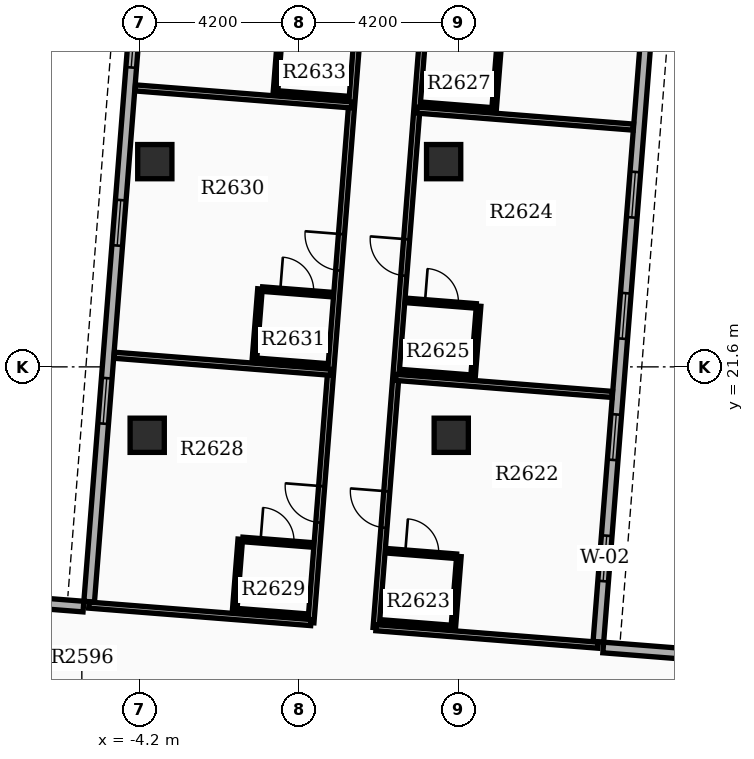
"""IFC4 building model, lengths in metres.
Left out: names, types, materials, properties, quantities, classifications, styles, units other than length and angle.
Written with IfcOpenShell. Run it as: python <this file> out.ifc"""

import sys

from ifc_helpers import new_model, si_unit, direction, frame, frame_2d, origin, origin_2d, place, context, subcontext, project, spatial, rectangle, extrude, element, fill, save


model = new_model("IFC4")
c1 = context("Model", 3, precision=1e-05, world=origin(), true_north=direction((0.0, 1.0)))
c2 = subcontext(c1, "Body", "Model", "MODEL_VIEW")
j1 = project(units=[si_unit("LENGTHUNIT", "METRE"), si_unit("PLANEANGLEUNIT", "RADIAN")], contexts=[c1])
p1 = place(None, origin())
s1 = spatial("IfcSite", under=j1, at=p1, CompositionType="ELEMENT")
p2 = place(p1, origin())
s2 = spatial("IfcBuilding", under=s1, at=p2, CompositionType="ELEMENT")
p3 = place(p2, frame((0.0, 0.0, 164.4)))
s3 = spatial("IfcBuildingStorey", under=s2, at=p3, CompositionType="ELEMENT", Elevation=164.4)
for number, where, z_axis, x_axis in (
    (1, (-4.0, 19.8, 0.0), (0.0, 0.0, 1.0), (1.0, 0.0, 0.0)),
    (2, (4.0, 19.8, 0.0), (0.0, 0.0, 1.0), (1.0, 0.0, 0.0)),
    (3, (-3.8, 27.0, 0.0), (0.0, 0.0, 1.0), (1.0, 0.0, 0.0)),
    (4, (3.8, 27.0, 0.0), (0.0, 0.0, 1.0), (1.0, 0.0, 0.0)),
):
    element("IfcColumn", number, at=place(p3, frame(where, z_axis=z_axis, x_axis=x_axis)), inside=s3, PredefinedType="COLUMN", context=c2, shape_type="SweptSolid", body=[
        extrude(rectangle(XDim=0.9, YDim=0.9, at=origin_2d()), origin(), (0.0, 0.0, 1.0), 3.9),
    ])
p4 = place(p3, frame((7.872, 14.367, 0.0), z_axis=(0.0, 0.0, 1.0), x_axis=(0.078452802979, 0.996917828963, 0.0)))
e5 = element("IfcWall", 5, at=p4, inside=s3, PredefinedType="STANDARD", context=c2, shape_type="SweptSolid", body=[
    extrude(rectangle(XDim=20.1, YDim=0.28, at=frame_2d((10.05, 0.0))), origin(), (0.0, 0.0, 1.0), 2.97),
])
p5 = place(p4, frame((1.6, 0.0, 0.8)))
e6 = element("IfcOpeningElement", 6, at=p5, cuts=e5, PredefinedType="OPENING", context=c2, shape_type="SweptSolid", body=[
    extrude(rectangle(XDim=1.2, YDim=1.6, at=frame_2d((0.6, 0.8))), frame((0.0, 0.15, 0.0), z_axis=(0.0, -1.0, 0.0), x_axis=(1.0, 0.0, 0.0)), (0.0, 0.0, 1.0), 0.3),
])
p6 = place(p4, frame((4.8, 0.0, 0.8)))
e7 = element("IfcOpeningElement", 7, at=p6, cuts=e5, PredefinedType="OPENING", context=c2, shape_type="SweptSolid", body=[
    extrude(rectangle(XDim=1.2, YDim=1.6, at=frame_2d((0.6, 0.8))), frame((0.0, 0.15, 0.0), z_axis=(0.0, -1.0, 0.0), x_axis=(1.0, 0.0, 0.0)), (0.0, 0.0, 1.0), 0.3),
])
p7 = place(p4, frame((8.0, 0.0, 0.8)))
e8 = element("IfcOpeningElement", 8, at=p7, cuts=e5, PredefinedType="OPENING", context=c2, shape_type="SweptSolid", body=[
    extrude(rectangle(XDim=1.2, YDim=1.6, at=frame_2d((0.6, 0.8))), frame((0.0, 0.15, 0.0), z_axis=(0.0, -1.0, 0.0), x_axis=(1.0, 0.0, 0.0)), (0.0, 0.0, 1.0), 0.3),
])
p8 = place(p4, frame((11.2, 0.0, 0.8)))
e9 = element("IfcOpeningElement", 9, at=p8, cuts=e5, PredefinedType="OPENING", context=c2, shape_type="SweptSolid", body=[
    extrude(rectangle(XDim=1.2, YDim=1.6, at=frame_2d((0.6, 0.8))), frame((0.0, 0.15, 0.0), z_axis=(0.0, -1.0, 0.0), x_axis=(1.0, 0.0, 0.0)), (0.0, 0.0, 1.0), 0.3),
])
p9 = place(p3, frame((-3.95, 35.459, 0.0), z_axis=(0.0, 0.0, 1.0), x_axis=(-0.078452802979, -0.996917828963, 0.0)))
e10 = element("IfcWall", 10, at=p9, inside=s3, PredefinedType="STANDARD", context=c2, shape_type="SweptSolid", body=[
    extrude(rectangle(XDim=20.1, YDim=0.28, at=frame_2d((10.05, 0.0))), origin(), (0.0, 0.0, 1.0), 2.97),
])
p10 = place(p9, frame((1.6, 0.0, 0.8)))
e11 = element("IfcOpeningElement", 11, at=p10, cuts=e10, PredefinedType="OPENING", context=c2, shape_type="SweptSolid", body=[
    extrude(rectangle(XDim=1.2, YDim=1.6, at=frame_2d((0.6, 0.8))), frame((0.0, 0.15, 0.0), z_axis=(0.0, -1.0, 0.0), x_axis=(1.0, 0.0, 0.0)), (0.0, 0.0, 1.0), 0.3),
])
p11 = place(p9, frame((4.8, 0.0, 0.8)))
e12 = element("IfcOpeningElement", 12, at=p11, cuts=e10, PredefinedType="OPENING", context=c2, shape_type="SweptSolid", body=[
    extrude(rectangle(XDim=1.2, YDim=1.6, at=frame_2d((0.6, 0.8))), frame((0.0, 0.15, 0.0), z_axis=(0.0, -1.0, 0.0), x_axis=(1.0, 0.0, 0.0)), (0.0, 0.0, 1.0), 0.3),
])
p12 = place(p9, frame((9.5, 0.0, 0.8)))
e13 = element("IfcOpeningElement", 13, at=p12, cuts=e10, PredefinedType="OPENING", context=c2, shape_type="SweptSolid", body=[
    extrude(rectangle(XDim=1.2, YDim=1.6, at=frame_2d((0.6, 0.8))), frame((0.0, 0.15, 0.0), z_axis=(0.0, -1.0, 0.0), x_axis=(1.0, 0.0, 0.0)), (0.0, 0.0, 1.0), 0.3),
])
p13 = place(p9, frame((14.2, 0.0, 0.8)))
e14 = element("IfcOpeningElement", 14, at=p13, cuts=e10, PredefinedType="OPENING", context=c2, shape_type="SweptSolid", body=[
    extrude(rectangle(XDim=1.2, YDim=1.6, at=frame_2d((0.6, 0.8))), frame((0.0, 0.15, 0.0), z_axis=(0.0, -1.0, 0.0), x_axis=(1.0, 0.0, 0.0)), (0.0, 0.0, 1.0), 0.3),
])
p14 = place(p3, frame((14.281, 13.722, 0.0), z_axis=(0.0, 0.0, 1.0), x_axis=(-0.99691915642, 0.078435932851, 0.0)))
e15 = element("IfcWall", 15, at=p14, inside=s3, PredefinedType="STANDARD", context=c2, shape_type="SweptSolid", body=[
    extrude(rectangle(XDim=6.3, YDim=0.28, at=frame_2d((3.15, 0.0))), origin(), (0.0, 0.0, 1.0), 2.97),
])
p15 = place(p3, frame((-11.958, 15.787, 0.0), z_axis=(0.0, 0.0, 1.0), x_axis=(0.996916125428, -0.078474447191, 0.0)))
e16 = element("IfcWall", 16, at=p15, inside=s3, PredefinedType="STANDARD", context=c2, shape_type="SweptSolid", body=[
    extrude(rectangle(XDim=6.3, YDim=0.28, at=frame_2d((3.15, 0.0))), origin(), (0.0, 0.0, 1.0), 2.97),
])
p16 = place(p3, frame((2.022, 14.737, 0.0), z_axis=(0.0, 0.0, 1.0), x_axis=(0.078461408156, 0.996917151738, 0.0)))
e17 = element("IfcWall", 17, at=p16, inside=s3, PredefinedType="PARTITIONING", context=c2, shape_type="SweptSolid", body=[
    extrude(rectangle(XDim=20.182, YDim=0.16, at=frame_2d((10.091, 0.0))), origin(), (0.0, 0.0, 1.0), 2.96),
])
p17 = place(p16, frame((2.641, 0.0, 0.0)))
e18 = element("IfcOpeningElement", 18, at=p17, cuts=e17, PredefinedType="OPENING", context=c2, shape_type="SweptSolid", body=[
    extrude(rectangle(XDim=0.96, YDim=2.15, at=frame_2d((0.48, 1.075))), frame((0.0, 0.09, 0.0), z_axis=(0.0, -1.0, 0.0), x_axis=(1.0, 0.0, 0.0)), (0.0, 0.0, 1.0), 0.18),
])
p18 = place(p16, frame((9.293, 0.0, 0.0)))
e19 = element("IfcOpeningElement", 19, at=p18, cuts=e17, PredefinedType="OPENING", context=c2, shape_type="SweptSolid", body=[
    extrude(rectangle(XDim=0.96, YDim=2.15, at=frame_2d((0.48, 1.075))), frame((0.0, 0.09, 0.0), z_axis=(0.0, -1.0, 0.0), x_axis=(1.0, 0.0, 0.0)), (0.0, 0.0, 1.0), 0.18),
])
p19 = place(p16, frame((18.93, 0.0, 0.0)))
e20 = element("IfcOpeningElement", 20, at=p19, cuts=e17, PredefinedType="OPENING", context=c2, shape_type="SweptSolid", body=[
    extrude(rectangle(XDim=0.96, YDim=2.15, at=frame_2d((0.48, 1.075))), frame((0.0, 0.09, 0.0), z_axis=(0.0, -1.0, 0.0), x_axis=(1.0, 0.0, 0.0)), (0.0, 0.0, 1.0), 0.18),
])
p20 = place(p3, frame((2.022, 14.737, 0.0), z_axis=(0.0, 0.0, 1.0), x_axis=(0.996918158581, -0.078448614343, 0.0)))
e21 = element("IfcWall", 21, at=p20, inside=s3, PredefinedType="PARTITIONING", context=c2, shape_type="SweptSolid", body=[
    extrude(rectangle(XDim=5.86, YDim=0.16, at=frame_2d((2.93, 0.0))), origin(), (0.0, 0.0, 1.0), 2.96),
])
p21 = place(p3, frame((2.541, 21.323, 0.0), z_axis=(0.0, 0.0, 1.0), x_axis=(0.996916388627, -0.078471103516, 0.0)))
e22 = element("IfcWall", 22, at=p21, inside=s3, PredefinedType="PARTITIONING", context=c2, shape_type="SweptSolid", body=[
    extrude(rectangle(XDim=5.712, YDim=0.16, at=frame_2d((2.856, 0.0))), origin(), (0.0, 0.0, 1.0), 2.96),
])
p22 = place(p3, frame((2.322, 16.76, 0.0), z_axis=(0.0, 0.0, 1.0), x_axis=(0.996916400774, -0.0784709492, 0.0)))
e23 = element("IfcWall", 23, at=p22, inside=s3, PredefinedType="PARTITIONING", context=c2, shape_type="SweptSolid", body=[
    extrude(rectangle(XDim=1.82, YDim=0.12, at=frame_2d((0.91, 0.0))), origin(), (0.0, 0.0, 1.0), 2.96),
])
p23 = place(p22, frame((0.47, 0.0, 0.0)))
e24 = element("IfcOpeningElement", 24, at=p23, cuts=e23, PredefinedType="OPENING", context=c2, shape_type="SweptSolid", body=[
    extrude(rectangle(XDim=0.88, YDim=2.1, at=frame_2d((0.44, 1.05))), frame((0.0, 0.07, 0.0), z_axis=(0.0, -1.0, 0.0), x_axis=(1.0, 0.0, 0.0)), (0.0, 0.0, 1.0), 0.14),
])
p24 = place(p3, frame((2.175, 14.885, 0.0), z_axis=(0.0, 0.0, 1.0), x_axis=(0.996916400774, -0.0784709492, 0.0)))
e25 = element("IfcWall", 25, at=p24, inside=s3, PredefinedType="PARTITIONING", context=c2, shape_type="SweptSolid", body=[
    extrude(rectangle(XDim=1.82, YDim=0.12, at=frame_2d((0.91, 0.0))), origin(), (0.0, 0.0, 1.0), 2.96),
])
p25 = place(p3, frame((4.054, 14.737, 0.0), z_axis=(0.0, 0.0, 1.0), x_axis=(0.078563244057, 0.996909131608, 0.0)))
e26 = element("IfcWall", 26, at=p25, inside=s3, PredefinedType="PARTITIONING", context=c2, shape_type="SweptSolid", body=[
    extrude(rectangle(XDim=1.88, YDim=0.12, at=frame_2d((0.94, 0.0))), origin(), (0.0, 0.0, 1.0), 2.96),
])
p26 = place(p3, frame((3.094, 28.357, 0.0), z_axis=(0.0, 0.0, 1.0), x_axis=(0.996916125428, -0.078474447191, 0.0)))
e27 = element("IfcWall", 27, at=p26, inside=s3, PredefinedType="PARTITIONING", context=c2, shape_type="SweptSolid", body=[
    extrude(rectangle(XDim=5.712, YDim=0.16, at=frame_2d((2.856, 0.0))), origin(), (0.0, 0.0, 1.0), 2.96),
])
p27 = place(p3, frame((2.841, 23.346, 0.0), z_axis=(0.0, 0.0, 1.0), x_axis=(0.996915574626, -0.078481444107, 0.0)))
e28 = element("IfcWall", 28, at=p27, inside=s3, PredefinedType="PARTITIONING", context=c2, shape_type="SweptSolid", body=[
    extrude(rectangle(XDim=1.82, YDim=0.12, at=frame_2d((0.91, 0.0))), origin(), (0.0, 0.0, 1.0), 2.96),
])
p28 = place(p27, frame((0.47, 0.0, 0.0)))
e29 = element("IfcOpeningElement", 29, at=p28, cuts=e28, PredefinedType="OPENING", context=c2, shape_type="SweptSolid", body=[
    extrude(rectangle(XDim=0.88, YDim=2.1, at=frame_2d((0.44, 1.05))), frame((0.0, 0.07, 0.0), z_axis=(0.0, -1.0, 0.0), x_axis=(1.0, 0.0, 0.0)), (0.0, 0.0, 1.0), 0.14),
])
p29 = place(p3, frame((2.693, 21.472, 0.0), z_axis=(0.0, 0.0, 1.0), x_axis=(0.996915574626, -0.078481444107, 0.0)))
e30 = element("IfcWall", 30, at=p29, inside=s3, PredefinedType="PARTITIONING", context=c2, shape_type="SweptSolid", body=[
    extrude(rectangle(XDim=1.82, YDim=0.12, at=frame_2d((0.91, 0.0))), origin(), (0.0, 0.0, 1.0), 2.96),
])
p30 = place(p3, frame((4.572, 21.324, 0.0), z_axis=(0.0, 0.0, 1.0), x_axis=(0.07843418698, 0.996919293781, 0.0)))
e31 = element("IfcWall", 31, at=p30, inside=s3, PredefinedType="PARTITIONING", context=c2, shape_type="SweptSolid", body=[
    extrude(rectangle(XDim=1.88, YDim=0.12, at=frame_2d((0.94, 0.0))), origin(), (0.0, 0.0, 1.0), 2.96),
])
p31 = place(p3, frame((3.247, 28.505, 0.0), z_axis=(0.0, 0.0, 1.0), x_axis=(0.996915574626, -0.078481444107, 0.0)))
e32 = element("IfcWall", 32, at=p31, inside=s3, PredefinedType="PARTITIONING", context=c2, shape_type="SweptSolid", body=[
    extrude(rectangle(XDim=1.82, YDim=0.12, at=frame_2d((0.91, 0.0))), origin(), (0.0, 0.0, 1.0), 2.96),
])
p32 = place(p3, frame((5.126, 28.357, 0.0), z_axis=(0.0, 0.0, 1.0), x_axis=(0.078444342213, 0.99691849475, 0.0)))
e33 = element("IfcWall", 33, at=p32, inside=s3, PredefinedType="PARTITIONING", context=c2, shape_type="SweptSolid", body=[
    extrude(rectangle(XDim=1.88, YDim=0.12, at=frame_2d((0.94, 0.0))), origin(), (0.0, 0.0, 1.0), 2.96),
])
p33 = place(p3, frame((0.308, 14.872, 0.0), z_axis=(0.0, 0.0, 1.0), x_axis=(0.0784484395, 0.996918172339, 0.0)))
e34 = element("IfcWall", 34, at=p33, inside=s3, PredefinedType="PARTITIONING", context=c2, shape_type="SweptSolid", body=[
    extrude(rectangle(XDim=20.182, YDim=0.16, at=frame_2d((10.091, 0.0))), origin(), (0.0, 0.0, 1.0), 2.96),
])
p34 = place(p33, frame((2.641, 0.0, 0.0)))
e35 = element("IfcOpeningElement", 35, at=p34, cuts=e34, PredefinedType="OPENING", context=c2, shape_type="SweptSolid", body=[
    extrude(rectangle(XDim=0.96, YDim=2.15, at=frame_2d((0.48, 1.075))), frame((0.0, 0.09, 0.0), z_axis=(0.0, -1.0, 0.0), x_axis=(1.0, 0.0, 0.0)), (0.0, 0.0, 1.0), 0.18),
])
p35 = place(p33, frame((9.293, 0.0, 0.0)))
e36 = element("IfcOpeningElement", 36, at=p35, cuts=e34, PredefinedType="OPENING", context=c2, shape_type="SweptSolid", body=[
    extrude(rectangle(XDim=0.96, YDim=2.15, at=frame_2d((0.48, 1.075))), frame((0.0, 0.09, 0.0), z_axis=(0.0, -1.0, 0.0), x_axis=(1.0, 0.0, 0.0)), (0.0, 0.0, 1.0), 0.18),
])
p36 = place(p33, frame((18.93, 0.0, 0.0)))
e37 = element("IfcOpeningElement", 37, at=p36, cuts=e34, PredefinedType="OPENING", context=c2, shape_type="SweptSolid", body=[
    extrude(rectangle(XDim=0.96, YDim=2.15, at=frame_2d((0.48, 1.075))), frame((0.0, 0.09, 0.0), z_axis=(0.0, -1.0, 0.0), x_axis=(1.0, 0.0, 0.0)), (0.0, 0.0, 1.0), 0.18),
])
p37 = place(p3, frame((0.308, 14.872, 0.0), z_axis=(0.0, 0.0, 1.0), x_axis=(-0.996914899516, 0.078490019252, 0.0)))
e38 = element("IfcWall", 38, at=p37, inside=s3, PredefinedType="PARTITIONING", context=c2, shape_type="SweptSolid", body=[
    extrude(rectangle(XDim=5.86, YDim=0.16, at=frame_2d((2.93, 0.0))), origin(), (0.0, 0.0, 1.0), 2.96),
])
p38 = place(p3, frame((0.826, 21.458, 0.0), z_axis=(0.0, 0.0, 1.0), x_axis=(-0.996916125428, 0.078474447191, 0.0)))
e39 = element("IfcWall", 39, at=p38, inside=s3, PredefinedType="PARTITIONING", context=c2, shape_type="SweptSolid", body=[
    extrude(rectangle(XDim=5.712, YDim=0.16, at=frame_2d((2.856, 0.0))), origin(), (0.0, 0.0, 1.0), 2.96),
])
p39 = place(p3, frame((-1.486, 17.059, 0.0), z_axis=(0.0, 0.0, 1.0), x_axis=(0.996926885478, -0.078337634704, 0.0)))
e40 = element("IfcWall", 40, at=p39, inside=s3, PredefinedType="PARTITIONING", context=c2, shape_type="SweptSolid", body=[
    extrude(rectangle(XDim=1.82, YDim=0.12, at=frame_2d((0.91, 0.0))), origin(), (0.0, 0.0, 1.0), 2.96),
])
p40 = place(p39, frame((0.47, 0.0, 0.0)))
e41 = element("IfcOpeningElement", 41, at=p40, cuts=e40, PredefinedType="OPENING", context=c2, shape_type="SweptSolid", body=[
    extrude(rectangle(XDim=0.88, YDim=2.1, at=frame_2d((0.44, 1.05))), frame((0.0, 0.07, 0.0), z_axis=(0.0, -1.0, 0.0), x_axis=(1.0, 0.0, 0.0)), (0.0, 0.0, 1.0), 0.14),
])
p41 = place(p3, frame((-1.634, 15.185, 0.0), z_axis=(0.0, 0.0, 1.0), x_axis=(0.996916400774, -0.0784709492, 0.0)))
e42 = element("IfcWall", 42, at=p41, inside=s3, PredefinedType="PARTITIONING", context=c2, shape_type="SweptSolid", body=[
    extrude(rectangle(XDim=1.82, YDim=0.12, at=frame_2d((0.91, 0.0))), origin(), (0.0, 0.0, 1.0), 2.96),
])
p42 = place(p3, frame((-1.698, 15.19, 0.0), z_axis=(0.0, 0.0, 1.0), x_axis=(0.078573415792, 0.996908329954, 0.0)))
e43 = element("IfcWall", 43, at=p42, inside=s3, PredefinedType="PARTITIONING", context=c2, shape_type="SweptSolid", body=[
    extrude(rectangle(XDim=1.88, YDim=0.12, at=frame_2d((0.94, 0.0))), origin(), (0.0, 0.0, 1.0), 2.96),
])
p43 = place(p3, frame((1.38, 28.492, 0.0), z_axis=(0.0, 0.0, 1.0), x_axis=(-0.996919468351, 0.07843196812, 0.0)))
e44 = element("IfcWall", 44, at=p43, inside=s3, PredefinedType="PARTITIONING", context=c2, shape_type="SweptSolid", body=[
    extrude(rectangle(XDim=5.712, YDim=0.16, at=frame_2d((2.856, 0.0))), origin(), (0.0, 0.0, 1.0), 2.96),
])
p44 = place(p3, frame((-0.968, 23.646, 0.0), z_axis=(0.0, 0.0, 1.0), x_axis=(0.996916400774, -0.0784709492, 0.0)))
e45 = element("IfcWall", 45, at=p44, inside=s3, PredefinedType="PARTITIONING", context=c2, shape_type="SweptSolid", body=[
    extrude(rectangle(XDim=1.82, YDim=0.12, at=frame_2d((0.91, 0.0))), origin(), (0.0, 0.0, 1.0), 2.96),
])
p45 = place(p44, frame((0.47, 0.0, 0.0)))
e46 = element("IfcOpeningElement", 46, at=p45, cuts=e45, PredefinedType="OPENING", context=c2, shape_type="SweptSolid", body=[
    extrude(rectangle(XDim=0.88, YDim=2.1, at=frame_2d((0.44, 1.05))), frame((0.0, 0.07, 0.0), z_axis=(0.0, -1.0, 0.0), x_axis=(1.0, 0.0, 0.0)), (0.0, 0.0, 1.0), 0.14),
])
p46 = place(p3, frame((-1.115, 21.771, 0.0), z_axis=(0.0, 0.0, 1.0), x_axis=(0.996926885478, -0.078337634704, 0.0)))
e47 = element("IfcWall", 47, at=p46, inside=s3, PredefinedType="PARTITIONING", context=c2, shape_type="SweptSolid", body=[
    extrude(rectangle(XDim=1.82, YDim=0.12, at=frame_2d((0.91, 0.0))), origin(), (0.0, 0.0, 1.0), 2.96),
])
p47 = place(p3, frame((-1.18, 21.777, 0.0), z_axis=(0.0, 0.0, 1.0), x_axis=(0.07843418698, 0.996919293781, 0.0)))
e48 = element("IfcWall", 48, at=p47, inside=s3, PredefinedType="PARTITIONING", context=c2, shape_type="SweptSolid", body=[
    extrude(rectangle(XDim=1.88, YDim=0.12, at=frame_2d((0.94, 0.0))), origin(), (0.0, 0.0, 1.0), 2.96),
])
p48 = place(p3, frame((-0.562, 28.805, 0.0), z_axis=(0.0, 0.0, 1.0), x_axis=(0.996916400774, -0.0784709492, 0.0)))
e49 = element("IfcWall", 49, at=p48, inside=s3, PredefinedType="PARTITIONING", context=c2, shape_type="SweptSolid", body=[
    extrude(rectangle(XDim=1.82, YDim=0.12, at=frame_2d((0.91, 0.0))), origin(), (0.0, 0.0, 1.0), 2.96),
])
p49 = place(p3, frame((-0.626, 28.81, 0.0), z_axis=(0.0, 0.0, 1.0), x_axis=(0.078444342213, 0.99691849475, 0.0)))
e50 = element("IfcWall", 50, at=p49, inside=s3, PredefinedType="PARTITIONING", context=c2, shape_type="SweptSolid", body=[
    extrude(rectangle(XDim=1.88, YDim=0.12, at=frame_2d((0.94, 0.0))), origin(), (0.0, 0.0, 1.0), 2.96),
])
p50 = place(p5, origin())
e51 = element("IfcWindow", 51, at=p50, inside=s3, PartitioningType="SINGLE_PANEL", PredefinedType="WINDOW", context=c2, shape_type="SweptSolid", body=[
    extrude(rectangle(XDim=1.2, YDim=1.6, at=frame_2d((0.6, 0.8))), frame((0.0, 0.03, 0.0), z_axis=(0.0, -1.0, 0.0), x_axis=(1.0, 0.0, 0.0)), (0.0, 0.0, 1.0), 0.06),
])
fill(e6, e51)
p51 = place(p6, origin())
e52 = element("IfcWindow", 52, at=p51, inside=s3, PartitioningType="SINGLE_PANEL", PredefinedType="WINDOW", context=c2, shape_type="SweptSolid", body=[
    extrude(rectangle(XDim=1.2, YDim=1.6, at=frame_2d((0.6, 0.8))), frame((0.0, 0.03, 0.0), z_axis=(0.0, -1.0, 0.0), x_axis=(1.0, 0.0, 0.0)), (0.0, 0.0, 1.0), 0.06),
])
fill(e7, e52)
p52 = place(p7, origin())
e53 = element("IfcWindow", 53, at=p52, inside=s3, PartitioningType="SINGLE_PANEL", PredefinedType="WINDOW", context=c2, shape_type="SweptSolid", body=[
    extrude(rectangle(XDim=1.2, YDim=1.6, at=frame_2d((0.6, 0.8))), frame((0.0, 0.03, 0.0), z_axis=(0.0, -1.0, 0.0), x_axis=(1.0, 0.0, 0.0)), (0.0, 0.0, 1.0), 0.06),
])
fill(e8, e53)
p53 = place(p8, origin())
e54 = element("IfcWindow", 54, at=p53, inside=s3, PartitioningType="SINGLE_PANEL", PredefinedType="WINDOW", context=c2, shape_type="SweptSolid", body=[
    extrude(rectangle(XDim=1.2, YDim=1.6, at=frame_2d((0.6, 0.8))), frame((0.0, 0.03, 0.0), z_axis=(0.0, -1.0, 0.0), x_axis=(1.0, 0.0, 0.0)), (0.0, 0.0, 1.0), 0.06),
])
fill(e9, e54)
p54 = place(p11, origin())
e55 = element("IfcWindow", 55, at=p54, inside=s3, PartitioningType="SINGLE_PANEL", PredefinedType="WINDOW", context=c2, shape_type="SweptSolid", body=[
    extrude(rectangle(XDim=1.2, YDim=1.6, at=frame_2d((0.6, 0.8))), frame((0.0, 0.03, 0.0), z_axis=(0.0, -1.0, 0.0), x_axis=(1.0, 0.0, 0.0)), (0.0, 0.0, 1.0), 0.06),
])
fill(e12, e55)
p55 = place(p12, origin())
e56 = element("IfcWindow", 56, at=p55, inside=s3, PartitioningType="SINGLE_PANEL", PredefinedType="WINDOW", context=c2, shape_type="SweptSolid", body=[
    extrude(rectangle(XDim=1.2, YDim=1.6, at=frame_2d((0.6, 0.8))), frame((0.0, 0.03, 0.0), z_axis=(0.0, -1.0, 0.0), x_axis=(1.0, 0.0, 0.0)), (0.0, 0.0, 1.0), 0.06),
])
fill(e13, e56)
p56 = place(p13, origin())
e57 = element("IfcWindow", 57, at=p56, inside=s3, PartitioningType="SINGLE_PANEL", PredefinedType="WINDOW", context=c2, shape_type="SweptSolid", body=[
    extrude(rectangle(XDim=1.2, YDim=1.6, at=frame_2d((0.6, 0.8))), frame((0.0, 0.03, 0.0), z_axis=(0.0, -1.0, 0.0), x_axis=(1.0, 0.0, 0.0)), (0.0, 0.0, 1.0), 0.06),
])
fill(e14, e57)
p57 = place(p17, origin())
e58 = element("IfcDoor", 58, at=p57, inside=s3, OperationType="SINGLE_SWING_RIGHT", PredefinedType="DOOR", context=c2, shape_type="SweptSolid", body=[
    extrude(rectangle(XDim=0.96, YDim=2.15, at=frame_2d((0.48, 1.075))), frame((0.0, 0.025, 0.0), z_axis=(0.0, -1.0, 0.0), x_axis=(1.0, 0.0, 0.0)), (0.0, 0.0, 1.0), 0.05),
])
fill(e18, e58)
p58 = place(p23, origin())
e59 = element("IfcDoor", 59, at=p58, inside=s3, OperationType="SINGLE_SWING_LEFT", PredefinedType="DOOR", context=c2, shape_type="SweptSolid", body=[
    extrude(rectangle(XDim=0.88, YDim=2.1, at=frame_2d((0.44, 1.05))), frame((0.0, 0.025, 0.0), z_axis=(0.0, -1.0, 0.0), x_axis=(1.0, 0.0, 0.0)), (0.0, 0.0, 1.0), 0.05),
])
fill(e24, e59)
p59 = place(p18, origin())
e60 = element("IfcDoor", 60, at=p59, inside=s3, OperationType="SINGLE_SWING_RIGHT", PredefinedType="DOOR", context=c2, shape_type="SweptSolid", body=[
    extrude(rectangle(XDim=0.96, YDim=2.15, at=frame_2d((0.48, 1.075))), frame((0.0, 0.025, 0.0), z_axis=(0.0, -1.0, 0.0), x_axis=(1.0, 0.0, 0.0)), (0.0, 0.0, 1.0), 0.05),
])
fill(e19, e60)
p60 = place(p28, origin())
e61 = element("IfcDoor", 61, at=p60, inside=s3, OperationType="SINGLE_SWING_LEFT", PredefinedType="DOOR", context=c2, shape_type="SweptSolid", body=[
    extrude(rectangle(XDim=0.88, YDim=2.1, at=frame_2d((0.44, 1.05))), frame((0.0, 0.025, 0.0), z_axis=(0.0, -1.0, 0.0), x_axis=(1.0, 0.0, 0.0)), (0.0, 0.0, 1.0), 0.05),
])
fill(e29, e61)
p61 = place(p34, origin())
e62 = element("IfcDoor", 62, at=p61, inside=s3, OperationType="SINGLE_SWING_RIGHT", PredefinedType="DOOR", context=c2, shape_type="SweptSolid", body=[
    extrude(rectangle(XDim=0.96, YDim=2.15, at=frame_2d((0.48, 1.075))), frame((0.0, 0.025, 0.0), z_axis=(0.0, -1.0, 0.0), x_axis=(1.0, 0.0, 0.0)), (0.0, 0.0, 1.0), 0.05),
])
fill(e35, e62)
p62 = place(p40, origin())
e63 = element("IfcDoor", 63, at=p62, inside=s3, OperationType="SINGLE_SWING_LEFT", PredefinedType="DOOR", context=c2, shape_type="SweptSolid", body=[
    extrude(rectangle(XDim=0.88, YDim=2.1, at=frame_2d((0.44, 1.05))), frame((0.0, 0.025, 0.0), z_axis=(0.0, -1.0, 0.0), x_axis=(1.0, 0.0, 0.0)), (0.0, 0.0, 1.0), 0.05),
])
fill(e41, e63)
p63 = place(p35, origin())
e64 = element("IfcDoor", 64, at=p63, inside=s3, OperationType="SINGLE_SWING_RIGHT", PredefinedType="DOOR", context=c2, shape_type="SweptSolid", body=[
    extrude(rectangle(XDim=0.96, YDim=2.15, at=frame_2d((0.48, 1.075))), frame((0.0, 0.025, 0.0), z_axis=(0.0, -1.0, 0.0), x_axis=(1.0, 0.0, 0.0)), (0.0, 0.0, 1.0), 0.05),
])
fill(e36, e64)
p64 = place(p45, origin())
e65 = element("IfcDoor", 65, at=p64, inside=s3, OperationType="SINGLE_SWING_LEFT", PredefinedType="DOOR", context=c2, shape_type="SweptSolid", body=[
    extrude(rectangle(XDim=0.88, YDim=2.1, at=frame_2d((0.44, 1.05))), frame((0.0, 0.025, 0.0), z_axis=(0.0, -1.0, 0.0), x_axis=(1.0, 0.0, 0.0)), (0.0, 0.0, 1.0), 0.05),
])
fill(e46, e65)
save(model, sys.argv[1])
